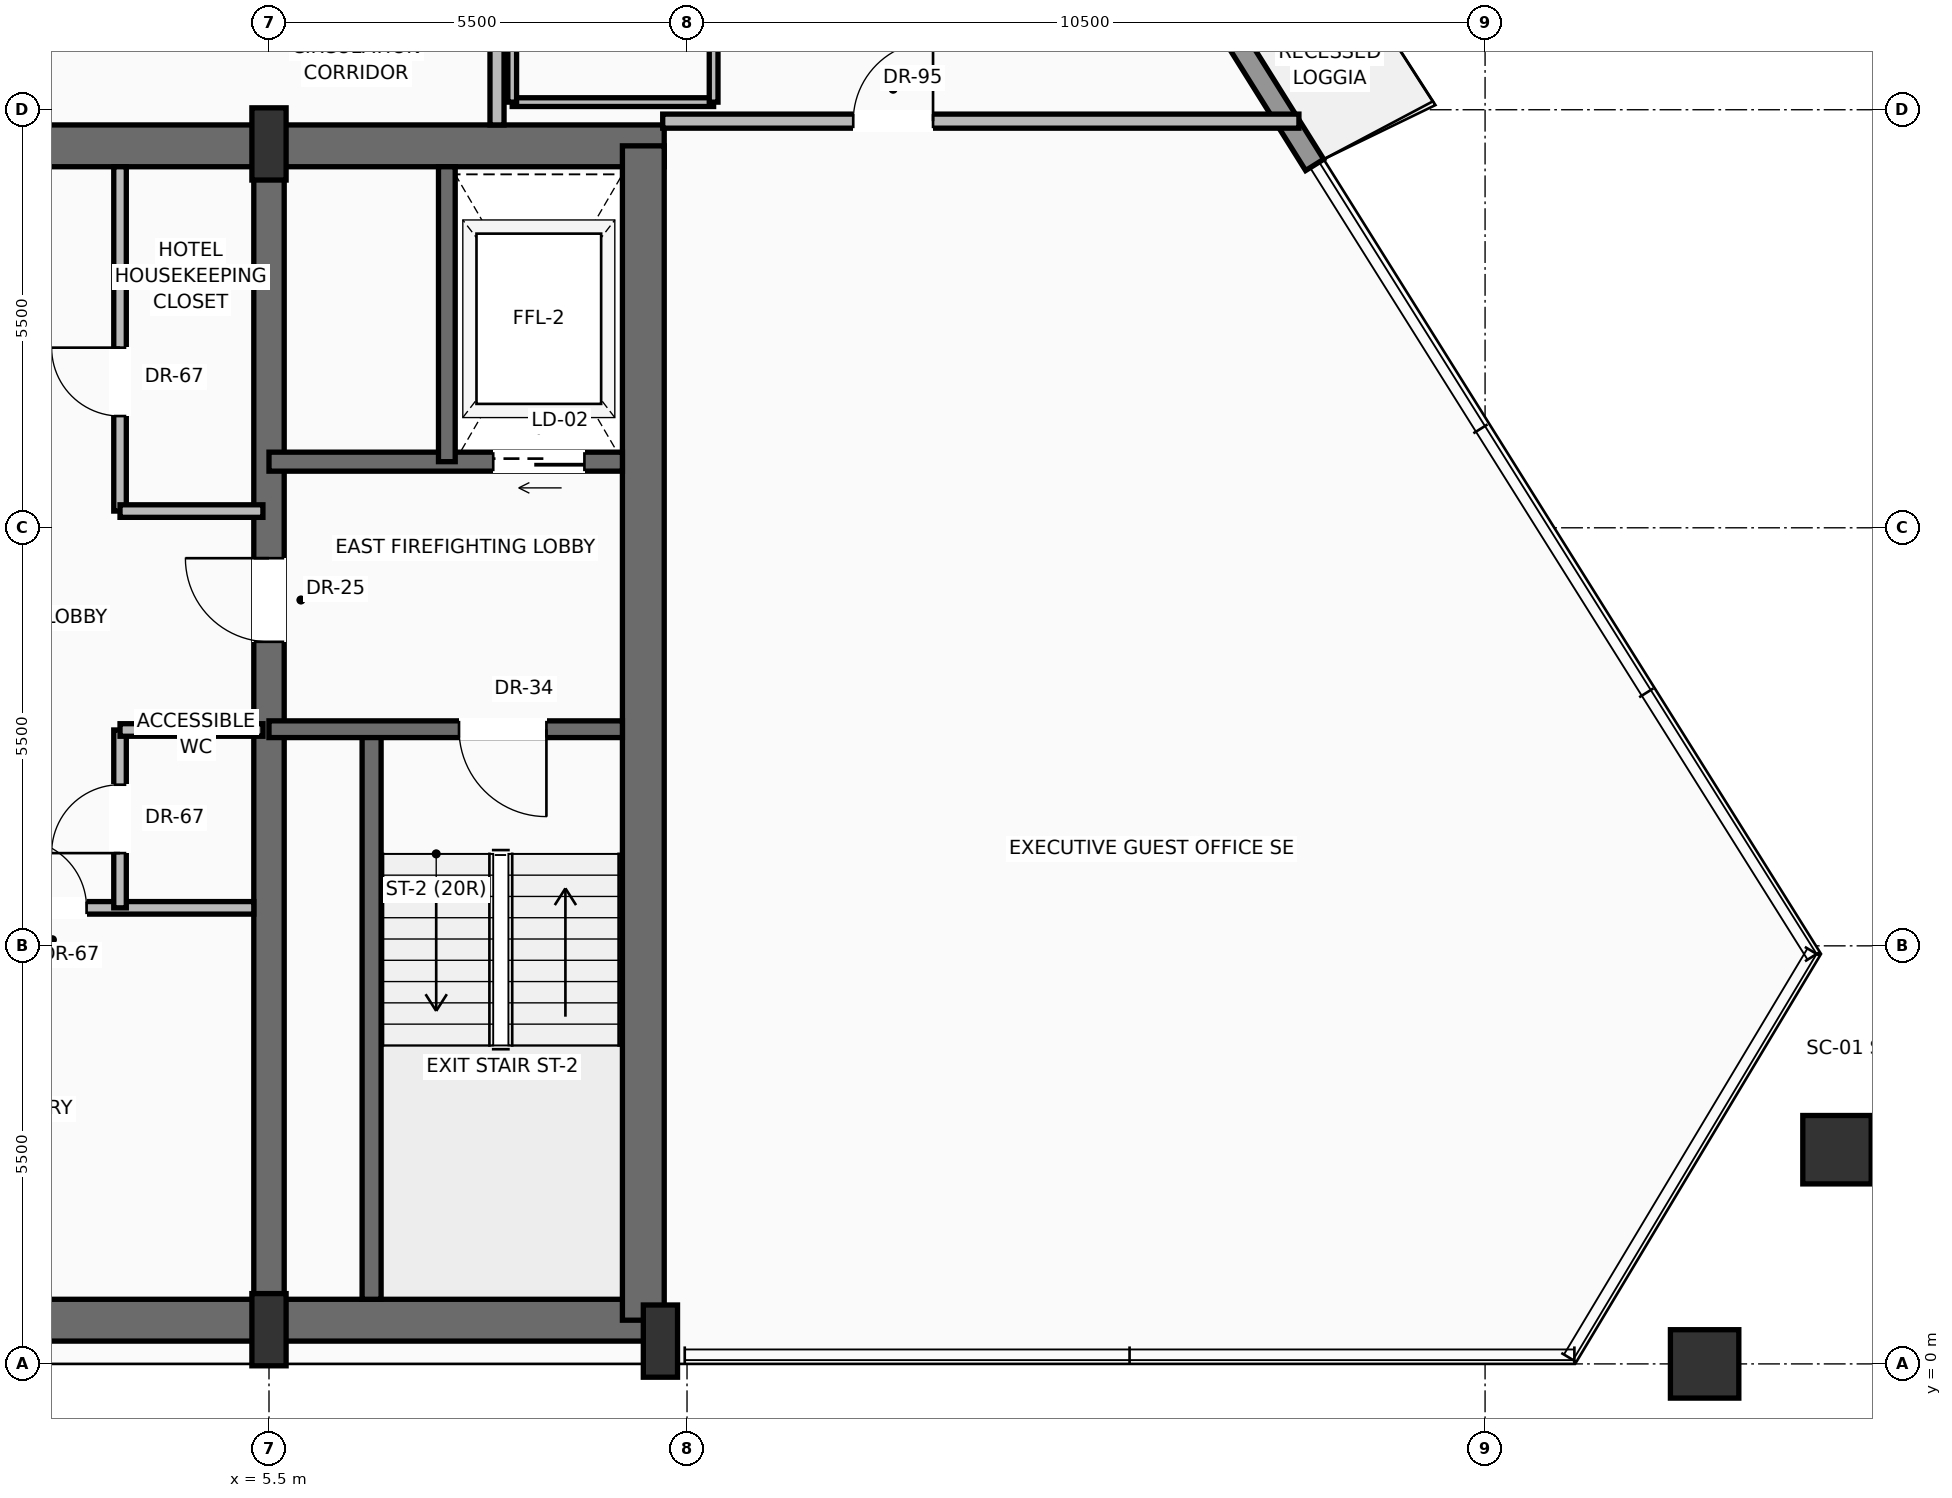
"""IFC4 building model, lengths in metres.
Left out: names, types, materials, properties, quantities, classifications, styles, units other than length and angle.
Written with IfcOpenShell. Run it as: python <this file> out.ifc"""

import sys

from ifc_helpers import new_model, si_unit, direction, frame, frame_2d, origin, origin_2d, place, context, subcontext, project, spatial, rectangle, hollow_rectangle, extrude, source, transform, mapped, element, fill, save


model = new_model("IFC4")
c1 = context("Model", 3, precision=1e-05, world=origin(), true_north=direction((0.0, 1.0)))
c2 = subcontext(c1, "Body", "Model", "MODEL_VIEW")
j1 = project(units=[si_unit("LENGTHUNIT", "METRE"), si_unit("PLANEANGLEUNIT", "RADIAN")], contexts=[c1])
p1 = place(None, origin())
s1 = spatial("IfcSite", under=j1, at=p1, CompositionType="ELEMENT")
p2 = place(p1, origin())
s2 = spatial("IfcBuilding", under=s1, at=p2, CompositionType="ELEMENT")
p3 = place(p2, frame((0.0, 0.0, 220.0)))
s3 = spatial("IfcBuildingStorey", under=s2, at=p3, CompositionType="ELEMENT", Elevation=220.0)
p4 = place(p3, frame((-10.65, 0.575, 0.0), z_axis=(0.0, 0.0, 1.0), x_axis=(1.0, 0.0, 0.0)))
e1 = element("IfcWall", 1, at=p4, inside=s3, PredefinedType="SHEAR", context=c2, shape_type="SweptSolid", body=[
    extrude(rectangle(XDim=21.3, YDim=0.55, at=frame_2d((10.65, 0.0))), origin(), (0.0, 0.0, 1.0), 3.24),
])
p5 = place(p3, frame((-10.7, 16.025, 0.0), z_axis=(0.0, 0.0, 1.0), x_axis=(1.0, 0.0, 0.0)))
e2 = element("IfcWall", 2, at=p5, inside=s3, PredefinedType="SHEAR", context=c2, shape_type="SweptSolid", body=[
    extrude(rectangle(XDim=21.4, YDim=0.55, at=frame_2d((10.7, 0.0))), origin(), (0.0, 0.0, 1.0), 3.24),
])
p6 = place(p5, frame((3.27, 0.0, 0.0)))
e3 = element("IfcOpeningElement", 3, at=p6, cuts=e2, PredefinedType="OPENING", context=c2, shape_type="SweptSolid", body=[
    extrude(rectangle(XDim=1.3, YDim=2.3, at=frame_2d((0.65, 1.15))), frame((0.0, 0.285, 0.0), z_axis=(0.0, -1.0, 0.0), x_axis=(1.0, 0.0, 0.0)), (0.0, 0.0, 1.0), 0.57),
])
p7 = place(p5, frame((9.7, 0.0, 0.0)))
e4 = element("IfcOpeningElement", 4, at=p7, cuts=e2, PredefinedType="OPENING", context=c2, shape_type="SweptSolid", body=[
    extrude(rectangle(XDim=2.0, YDim=2.4, at=frame_2d((1.0, 1.2))), frame((0.0, 0.285, 0.0), z_axis=(0.0, -1.0, 0.0), x_axis=(1.0, 0.0, 0.0)), (0.0, 0.0, 1.0), 0.57),
])
p8 = place(p3, frame((10.425, 0.575, 0.0), z_axis=(0.0, 0.0, 1.0), x_axis=(0.0, 1.0, 0.0)))
e5 = element("IfcWall", 5, at=p8, inside=s3, PredefinedType="SHEAR", context=c2, shape_type="SweptSolid", body=[
    extrude(rectangle(XDim=15.45, YDim=0.55, at=frame_2d((7.725, 0.0))), origin(), (0.0, 0.0, 1.0), 3.24),
])
p9 = place(p3, frame((5.5, 0.575, 0.0), z_axis=(0.0, 0.0, 1.0), x_axis=(0.0, 1.0, 0.0)))
e6 = element("IfcWall", 6, at=p9, inside=s3, PredefinedType="SHEAR", context=c2, shape_type="SweptSolid", body=[
    extrude(rectangle(XDim=15.45, YDim=0.4, at=frame_2d((7.725, 0.0))), origin(), (0.0, 0.0, 1.0), 3.24),
])
p10 = place(p9, frame((8.925, 0.0, 0.0)))
e7 = element("IfcOpeningElement", 7, at=p10, cuts=e6, PredefinedType="OPENING", context=c2, shape_type="SweptSolid", body=[
    extrude(rectangle(XDim=1.1, YDim=2.2, at=frame_2d((0.55, 1.1))), frame((0.0, 0.21, 0.0), z_axis=(0.0, -1.0, 0.0), x_axis=(1.0, 0.0, 0.0)), (0.0, 0.0, 1.0), 0.42),
])
m1 = source(origin(), c2, "Body", "SweptSolid", [
    extrude(rectangle(XDim=0.45, YDim=0.95, at=origin_2d()), origin(), (0.0, 0.0, 1.0), 3.45),
])
for number, where, z_axis, x_axis in (
    (8, (5.5, 0.45, 0.0), (0.0, 0.0, 1.0), (1.0, 0.0, 0.0)),
    (9, (10.65, 0.3, 0.0), (0.0, 0.0, 1.0), (1.0, 0.0, 0.0)),
    (10, (5.5, 16.05, 0.0), (0.0, 0.0, 1.0), (1.0, 0.0, 0.0)),
):
    element("IfcColumn", number, at=place(p3, frame(where, z_axis=z_axis, x_axis=x_axis)), inside=s3, PredefinedType="PILASTER", context=c2, shape_type="MappedRepresentation", body=[
        mapped(m1, transform((0.0, 0.0, 0.0), scale=1.0)),
    ])
m2 = source(origin(), c2, "Body", "SweptSolid", [
    extrude(hollow_rectangle(XDim=0.9, YDim=0.9, WallThickness=0.045, at=origin_2d()), origin(), (0.0, 0.0, 1.0), 3.441),
])
p11 = place(p3, frame((24.389, 0.0, 0.004), z_axis=(0.003121659143, 0.0, 0.99999512761), x_axis=(0.0, 1.0, 0.0)))
e11 = element("IfcColumn", 11, at=p11, inside=s3, PredefinedType="COLUMN", context=c2, shape_type="MappedRepresentation", body=[
    mapped(m2, transform((0.0, 0.0, 0.0), scale=1.0)),
])
m3 = source(origin(), c2, "Body", "SweptSolid", [
    extrude(hollow_rectangle(XDim=0.9, YDim=0.9, WallThickness=0.045, at=origin_2d()), origin(), (0.0, 0.0, 1.0), 3.442),
])
p12 = place(p3, frame((26.13, 2.818, 0.004), z_axis=(-0.008724933304, -0.016811456855, 0.999820609138), x_axis=(0.88758442391, -0.460645080764, 0.0)))
e12 = element("IfcColumn", 12, at=p12, inside=s3, PredefinedType="COLUMN", context=c2, shape_type="MappedRepresentation", body=[
    mapped(m3, transform((0.0, 0.0, 0.0), scale=1.0)),
])
p13 = place(p3, frame((8.975, 32.204, 0.0), z_axis=(0.0, 0.0, 1.0), x_axis=(0.530553627254, -0.847651372091, 0.0)))
e13 = element("IfcWall", 13, at=p13, inside=s3, PredefinedType="SOLIDWALL", context=c2, shape_type="SweptSolid", body=[
    extrude(rectangle(XDim=19.382, YDim=0.28, at=frame_2d((9.691, 0.0))), origin(), (0.0, 0.0, 1.0), 2.82),
])
p14 = place(p13, frame((4.652, 0.0, 0.0)))
e14 = element("IfcOpeningElement", 14, at=p14, cuts=e13, PredefinedType="OPENING", context=c2, shape_type="SweptSolid", body=[
    extrude(rectangle(XDim=1.6, YDim=2.35, at=frame_2d((0.8, 1.175))), frame((0.0, 0.15, 0.0), z_axis=(0.0, -1.0, 0.0), x_axis=(1.0, 0.0, 0.0)), (0.0, 0.0, 1.0), 0.3),
])
p15 = place(p13, frame((13.18, 0.0, 0.9)))
e15 = element("IfcOpeningElement", 15, at=p15, cuts=e13, PredefinedType="OPENING", context=c2, shape_type="SweptSolid", body=[
    extrude(rectangle(XDim=2.0, YDim=1.75, at=frame_2d((1.0, 0.875))), frame((0.0, 0.15, 0.0), z_axis=(0.0, -1.0, 0.0), x_axis=(1.0, 0.0, 0.0)), (0.0, 0.0, 1.0), 0.3),
])
p16 = place(p3, frame((6.85, 0.85, 0.0), z_axis=(0.0, 0.0, 1.0), x_axis=(0.0, 1.0, 0.0)))
e16 = element("IfcWall", 16, at=p16, inside=s3, PredefinedType="SOLIDWALL", context=c2, shape_type="SweptSolid", body=[
    extrude(rectangle(XDim=7.5, YDim=0.25, at=frame_2d((3.75, 0.0))), origin(), (0.0, 0.0, 1.0), 3.24),
])
p17 = place(p3, frame((10.15, 8.35, 0.0), z_axis=(0.0, 0.0, 1.0), x_axis=(-1.0, 0.0, 0.0)))
e17 = element("IfcWall", 17, at=p17, inside=s3, PredefinedType="SOLIDWALL", context=c2, shape_type="SweptSolid", body=[
    extrude(rectangle(XDim=4.65, YDim=0.22, at=frame_2d((2.325, 0.0))), origin(), (0.0, 0.0, 1.0), 3.24),
])
p18 = place(p17, frame((1.0, 0.0, 0.0)))
e18 = element("IfcOpeningElement", 18, at=p18, cuts=e17, PredefinedType="OPENING", context=c2, shape_type="SweptSolid", body=[
    extrude(rectangle(XDim=1.15, YDim=2.2, at=frame_2d((0.575, 1.1))), frame((0.0, 0.12, 0.0), z_axis=(0.0, -1.0, 0.0), x_axis=(1.0, 0.0, 0.0)), (0.0, 0.0, 1.0), 0.24),
])
p19 = place(p3, frame((10.15, 11.87, 0.0), z_axis=(0.0, 0.0, 1.0), x_axis=(-1.0, 0.0, 0.0)))
e19 = element("IfcWall", 19, at=p19, inside=s3, PredefinedType="SOLIDWALL", context=c2, shape_type="SweptSolid", body=[
    extrude(rectangle(XDim=4.65, YDim=0.25, at=frame_2d((2.325, 0.0))), origin(), (0.0, 0.0, 1.0), 3.24),
])
p20 = place(p19, frame((0.5, 0.0, 0.0)))
e20 = element("IfcOpeningElement", 20, at=p20, cuts=e19, PredefinedType="OPENING", context=c2, shape_type="SweptSolid", body=[
    extrude(rectangle(XDim=1.2, YDim=2.25, at=frame_2d((0.6, 1.125))), frame((0.0, 0.135, 0.0), z_axis=(0.0, -1.0, 0.0), x_axis=(1.0, 0.0, 0.0)), (0.0, 0.0, 1.0), 0.27),
])
p21 = place(p3, frame((7.84, 11.87, 0.0), z_axis=(0.0, 0.0, 1.0), x_axis=(0.0, 1.0, 0.0)))
e21 = element("IfcWall", 21, at=p21, inside=s3, PredefinedType="SOLIDWALL", context=c2, shape_type="SweptSolid", body=[
    extrude(rectangle(XDim=3.88, YDim=0.22, at=frame_2d((1.94, 0.0))), origin(), (0.0, 0.0, 1.0), 3.24),
])
p22 = place(p3, frame((1.82, 6.0, 0.0), z_axis=(0.0, 0.0, 1.0), x_axis=(1.0, 0.0, 0.0)))
e22 = element("IfcWall", 22, at=p22, inside=s3, PredefinedType="PARTITIONING", context=c2, shape_type="SweptSolid", body=[
    extrude(rectangle(XDim=3.48, YDim=0.165, at=frame_2d((1.74, 0.0))), origin(), (0.0, 0.0, 1.0), 3.232),
])
p23 = place(p22, frame((0.38, 0.0, 0.0)))
e23 = element("IfcOpeningElement", 23, at=p23, cuts=e22, PredefinedType="OPENING", context=c2, shape_type="SweptSolid", body=[
    extrude(rectangle(XDim=0.9, YDim=2.1, at=frame_2d((0.45, 1.05))), frame((0.0, 0.093, 0.0), z_axis=(0.0, -1.0, 0.0), x_axis=(1.0, 0.0, 0.0)), (0.0, 0.0, 1.0), 0.185),
])
p24 = place(p3, frame((3.54, 6.0, 0.0), z_axis=(0.0, 0.0, 1.0), x_axis=(0.0, 1.0, 0.0)))
e24 = element("IfcWall", 24, at=p24, inside=s3, PredefinedType="PARTITIONING", context=c2, shape_type="SweptSolid", body=[
    extrude(rectangle(XDim=2.34, YDim=0.165, at=frame_2d((1.17, 0.0))), origin(), (0.0, 0.0, 1.0), 3.232),
])
p25 = place(p24, frame((0.72, 0.0, 0.0)))
e25 = element("IfcOpeningElement", 25, at=p25, cuts=e24, PredefinedType="OPENING", context=c2, shape_type="SweptSolid", body=[
    extrude(rectangle(XDim=0.9, YDim=2.1, at=frame_2d((0.45, 1.05))), frame((0.0, 0.093, 0.0), z_axis=(0.0, -1.0, 0.0), x_axis=(1.0, 0.0, 0.0)), (0.0, 0.0, 1.0), 0.185),
])
p26 = place(p3, frame((3.54, 8.34, 0.0), z_axis=(0.0, 0.0, 1.0), x_axis=(1.0, 0.0, 0.0)))
e26 = element("IfcWall", 26, at=p26, inside=s3, PredefinedType="PARTITIONING", context=c2, shape_type="SweptSolid", body=[
    extrude(rectangle(XDim=1.88, YDim=0.165, at=frame_2d((0.94, 0.0))), origin(), (0.0, 0.0, 1.0), 3.232),
])
p27 = place(p3, frame((3.54, 11.22, 0.0), z_axis=(0.0, 0.0, 1.0), x_axis=(0.0, 1.0, 0.0)))
e27 = element("IfcWall", 27, at=p27, inside=s3, PredefinedType="PARTITIONING", context=c2, shape_type="SweptSolid", body=[
    extrude(rectangle(XDim=4.53, YDim=0.165, at=frame_2d((2.265, 0.0))), origin(), (0.0, 0.0, 1.0), 3.232),
])
p28 = place(p27, frame((1.25, 0.0, 0.0)))
e28 = element("IfcOpeningElement", 28, at=p28, cuts=e27, PredefinedType="OPENING", context=c2, shape_type="SweptSolid", body=[
    extrude(rectangle(XDim=0.9, YDim=2.1, at=frame_2d((0.45, 1.05))), frame((0.0, 0.093, 0.0), z_axis=(0.0, -1.0, 0.0), x_axis=(1.0, 0.0, 0.0)), (0.0, 0.0, 1.0), 0.185),
])
p29 = place(p3, frame((3.54, 11.22, 0.0), z_axis=(0.0, 0.0, 1.0), x_axis=(1.0, 0.0, 0.0)))
e29 = element("IfcWall", 29, at=p29, inside=s3, PredefinedType="PARTITIONING", context=c2, shape_type="SweptSolid", body=[
    extrude(rectangle(XDim=1.88, YDim=0.165, at=frame_2d((0.94, 0.0))), origin(), (0.0, 0.0, 1.0), 3.232),
])
p30 = place(p3, frame((8.5, 16.3, 0.0), z_axis=(0.0, 0.0, 1.0), x_axis=(0.0, 1.0, 0.0)))
e30 = element("IfcWall", 30, at=p30, inside=s3, PredefinedType="PARTITIONING", context=c2, shape_type="SweptSolid", body=[
    extrude(rectangle(XDim=13.3, YDim=0.185, at=frame_2d((6.65, 0.0))), origin(), (0.0, 0.0, 1.0), 3.232),
])
p31 = place(p30, frame((3.136, 0.0, 0.0)))
e31 = element("IfcOpeningElement", 31, at=p31, cuts=e30, PredefinedType="OPENING", context=c2, shape_type="SweptSolid", body=[
    extrude(rectangle(XDim=1.05, YDim=2.25, at=frame_2d((0.525, 1.125))), frame((0.0, 0.103, 0.0), z_axis=(0.0, -1.0, 0.0), x_axis=(1.0, 0.0, 0.0)), (0.0, 0.0, 1.0), 0.205),
])
p32 = place(p30, frame((9.636, 0.0, 0.0)))
e32 = element("IfcOpeningElement", 32, at=p32, cuts=e30, PredefinedType="OPENING", context=c2, shape_type="SweptSolid", body=[
    extrude(rectangle(XDim=1.05, YDim=2.25, at=frame_2d((0.525, 1.125))), frame((0.0, 0.103, 0.0), z_axis=(0.0, -1.0, 0.0), x_axis=(1.0, 0.0, 0.0)), (0.0, 0.0, 1.0), 0.205),
])
p33 = place(p3, frame((10.68, 16.35, 0.0), z_axis=(0.0, 0.0, 1.0), x_axis=(1.0, 0.0, 0.0)))
e33 = element("IfcWall", 33, at=p33, inside=s3, PredefinedType="PARTITIONING", context=c2, shape_type="SweptSolid", body=[
    extrude(rectangle(XDim=8.371, YDim=0.185, at=frame_2d((4.186, 0.0))), origin(), (0.0, 0.0, 1.0), 3.232),
])
p34 = place(p33, frame((2.507, 0.0, 0.0)))
e34 = element("IfcOpeningElement", 34, at=p34, cuts=e33, PredefinedType="OPENING", context=c2, shape_type="SweptSolid", body=[
    extrude(rectangle(XDim=1.05, YDim=2.25, at=frame_2d((0.525, 1.125))), frame((0.0, 0.103, 0.0), z_axis=(0.0, -1.0, 0.0), x_axis=(1.0, 0.0, 0.0)), (0.0, 0.0, 1.0), 0.205),
])
p35 = place(p3, frame((8.7, 16.6, 0.0), z_axis=(0.0, 0.0, 1.0), x_axis=(1.0, 0.0, 0.0)))
e35 = element("IfcWall", 35, at=p35, inside=s3, PredefinedType="PARTITIONING", context=c2, shape_type="SweptSolid", body=[
    extrude(rectangle(XDim=2.65, YDim=0.115, at=frame_2d((1.325, 0.0))), origin(), (0.0, 0.0, 1.0), 3.232),
])
p36 = place(p3, frame((8.7, 16.6, 0.0), z_axis=(0.0, 0.0, 1.0), x_axis=(0.0, 1.0, 0.0)))
e36 = element("IfcWall", 36, at=p36, inside=s3, PredefinedType="PARTITIONING", context=c2, shape_type="SweptSolid", body=[
    extrude(rectangle(XDim=2.4, YDim=0.115, at=frame_2d((1.2, 0.0))), origin(), (0.0, 0.0, 1.0), 3.232),
])
p37 = place(p3, frame((11.35, 16.6, 0.0), z_axis=(0.0, 0.0, 1.0), x_axis=(0.0, 1.0, 0.0)))
e37 = element("IfcWall", 37, at=p37, inside=s3, PredefinedType="PARTITIONING", context=c2, shape_type="SweptSolid", body=[
    extrude(rectangle(XDim=2.4, YDim=0.115, at=frame_2d((1.2, 0.0))), origin(), (0.0, 0.0, 1.0), 3.232),
])
p38 = place(p37, frame((0.75, 0.0, 0.0)))
e38 = element("IfcOpeningElement", 38, at=p38, cuts=e37, PredefinedType="OPENING", context=c2, shape_type="SweptSolid", body=[
    extrude(rectangle(XDim=0.9, YDim=2.15, at=frame_2d((0.45, 1.075))), frame((0.0, 0.067, 0.0), z_axis=(0.0, -1.0, 0.0), x_axis=(1.0, 0.0, 0.0)), (0.0, 0.0, 1.0), 0.135),
])
m4 = source(origin(), c2, "Body", "SweptSolid", [
    extrude(rectangle(XDim=1.15, YDim=2.2, at=frame_2d((0.575, 1.1))), frame((0.0, 0.025, 0.0), z_axis=(0.0, -1.0, 0.0), x_axis=(1.0, 0.0, 0.0)), (0.0, 0.0, 1.0), 0.05),
])
p39 = place(p18, origin())
e39 = element("IfcDoor", 39, at=p39, inside=s3, OperationType="SINGLE_SWING_LEFT", PredefinedType="DOOR", context=c2, shape_type="MappedRepresentation", body=[
    mapped(m4, transform((0.0, 0.0, 0.0), scale=1.0)),
])
fill(e18, e39)
m5 = source(origin(), c2, "Body", "SweptSolid", [
    extrude(rectangle(XDim=1.1, YDim=2.2, at=frame_2d((0.55, 1.1))), frame((0.0, 0.025, 0.0), z_axis=(0.0, -1.0, 0.0), x_axis=(1.0, 0.0, 0.0)), (0.0, 0.0, 1.0), 0.05),
])
p40 = place(p10, origin())
e40 = element("IfcDoor", 40, at=p40, inside=s3, OperationType="SINGLE_SWING_RIGHT", PredefinedType="DOOR", context=c2, shape_type="MappedRepresentation", body=[
    mapped(m5, transform((0.0, 0.0, 0.0), scale=1.0)),
])
fill(e7, e40)
m6 = source(origin(), c2, "Body", "SweptSolid", [
    extrude(rectangle(XDim=1.2, YDim=2.25, at=frame_2d((0.6, 1.125))), frame((0.0, 0.025, 0.0), z_axis=(0.0, -1.0, 0.0), x_axis=(1.0, 0.0, 0.0)), (0.0, 0.0, 1.0), 0.05),
])
p41 = place(p20, origin())
e41 = element("IfcDoor", 41, at=p41, inside=s3, OperationType="SLIDING_TO_RIGHT", PredefinedType="DOOR", context=c2, shape_type="MappedRepresentation", body=[
    mapped(m6, transform((0.0, 0.0, 0.0), scale=1.0)),
])
fill(e20, e41)
m7 = source(origin(), c2, "Body", "SweptSolid", [
    extrude(rectangle(XDim=0.9, YDim=2.1, at=frame_2d((0.45, 1.05))), frame((0.0, 0.025, 0.0), z_axis=(0.0, -1.0, 0.0), x_axis=(1.0, 0.0, 0.0)), (0.0, 0.0, 1.0), 0.05),
])
p42 = place(p23, origin())
e42 = element("IfcDoor", 42, at=p42, inside=s3, OperationType="SINGLE_SWING_LEFT", PredefinedType="DOOR", context=c2, shape_type="MappedRepresentation", body=[
    mapped(m7, transform((0.0, 0.0, 0.0), scale=1.0)),
])
fill(e23, e42)
p43 = place(p25, origin())
e43 = element("IfcDoor", 43, at=p43, inside=s3, OperationType="SINGLE_SWING_LEFT", PredefinedType="DOOR", context=c2, shape_type="MappedRepresentation", body=[
    mapped(m7, transform((0.0, 0.0, 0.0), scale=1.0)),
])
fill(e25, e43)
p44 = place(p28, origin())
e44 = element("IfcDoor", 44, at=p44, inside=s3, OperationType="SINGLE_SWING_RIGHT", PredefinedType="DOOR", context=c2, shape_type="MappedRepresentation", body=[
    mapped(m7, transform((0.0, 0.0, 0.0), scale=1.0)),
])
fill(e28, e44)
m8 = source(origin(), c2, "Body", "SweptSolid", [
    extrude(rectangle(XDim=1.05, YDim=2.25, at=frame_2d((0.525, 1.125))), frame((0.0, 0.025, 0.0), z_axis=(0.0, -1.0, 0.0), x_axis=(1.0, 0.0, 0.0)), (0.0, 0.0, 1.0), 0.05),
])
p45 = place(p34, origin())
e45 = element("IfcDoor", 45, at=p45, inside=s3, OperationType="SINGLE_SWING_RIGHT", PredefinedType="DOOR", context=c2, shape_type="MappedRepresentation", body=[
    mapped(m8, transform((0.0, 0.0, 0.0), scale=1.0)),
])
fill(e34, e45)
save(model, sys.argv[1])
